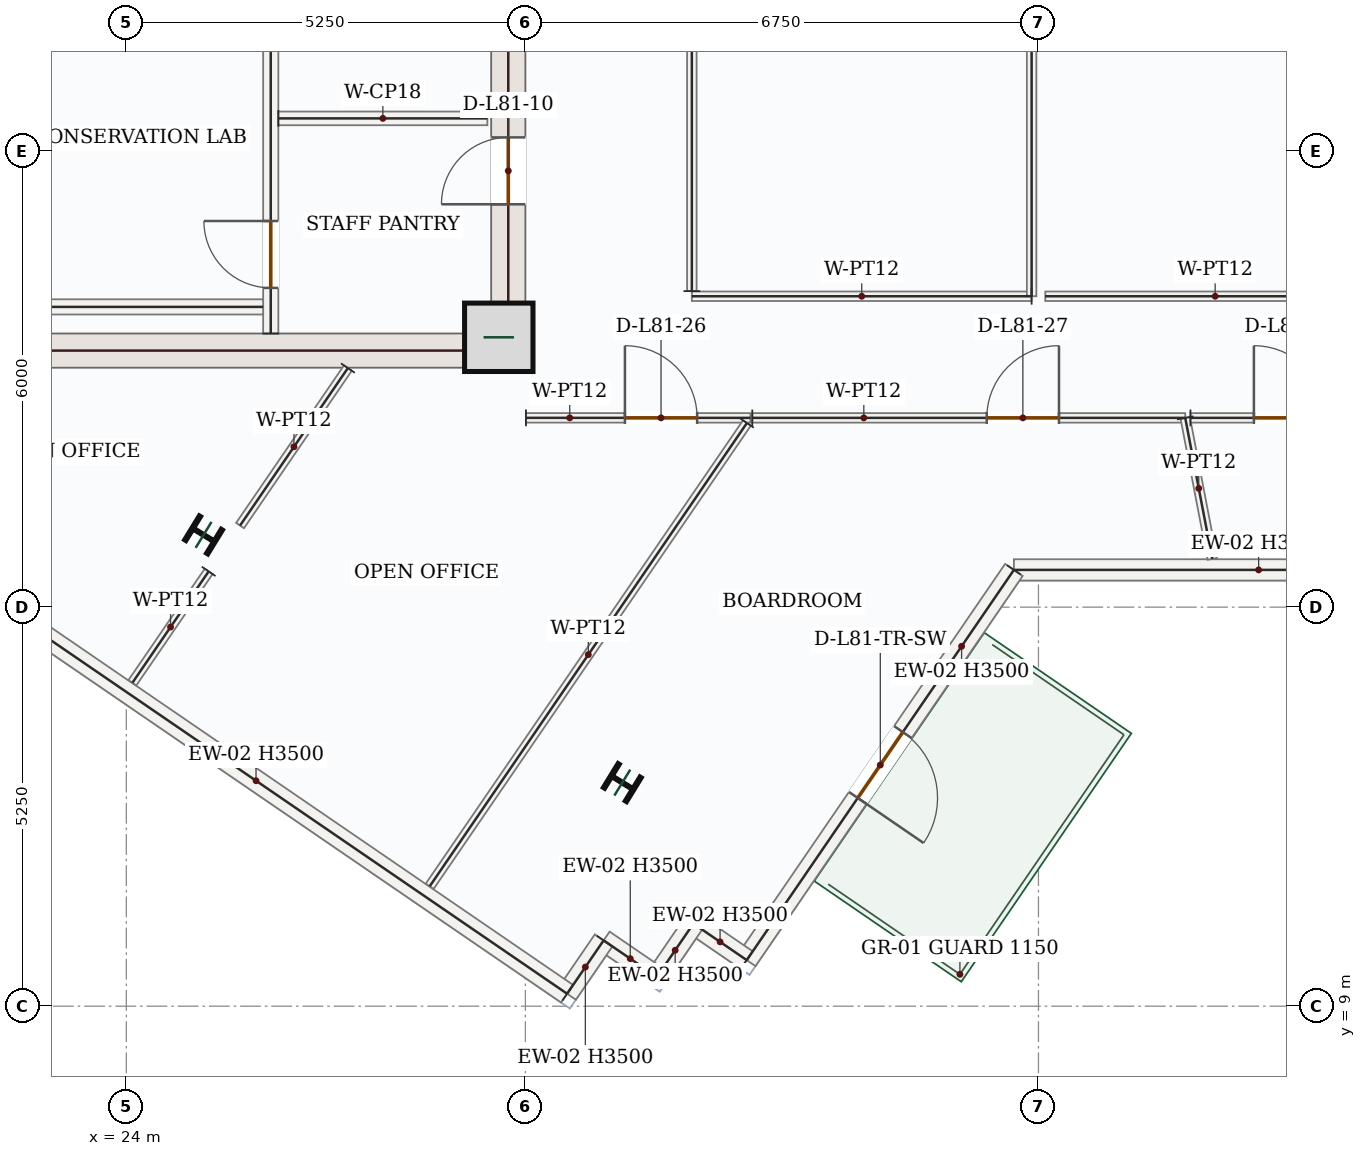
"""IFC4 building model, lengths in metres.
Left out: names, types, materials, properties, quantities, classifications, styles, units other than length and angle.
Written with IfcOpenShell. Run it as: python <this file> out.ifc"""

import sys

from ifc_helpers import new_model, si_unit, direction, frame, frame_2d, origin, origin_2d, place, context, subcontext, project, spatial, rectangle, i_section, extrude, source, transform, mapped, element, fill, save


model = new_model("IFC4")
c1 = context("Model", 3, precision=1e-05, world=origin(), true_north=direction((0.0, 1.0)))
c2 = subcontext(c1, "Body", "Model", "MODEL_VIEW")
j1 = project(units=[si_unit("LENGTHUNIT", "METRE"), si_unit("PLANEANGLEUNIT", "RADIAN")], contexts=[c1])
p1 = place(None, origin())
s1 = spatial("IfcSite", under=j1, at=p1, CompositionType="ELEMENT")
p2 = place(p1, origin())
s2 = spatial("IfcBuilding", under=s1, at=p2, CompositionType="ELEMENT")
p3 = place(p2, frame((0.0, 0.0, 334.8)))
s3 = spatial("IfcBuildingStorey", under=s2, at=p3, CompositionType="ELEMENT", Elevation=334.8)
p4 = place(p3, frame((29.025, 17.4, 0.0), z_axis=(0.0, 0.0, 1.0), x_axis=(0.0, 1.0, 0.0)))
e1 = element("IfcWall", 1, at=p4, inside=s3, PredefinedType="SHEAR", context=c2, shape_type="SweptSolid", body=[
    extrude(rectangle(XDim=8.55, YDim=0.45, at=frame_2d((4.275, 0.0))), origin(), (0.0, 0.0, 1.0), 3.5),
])
p5 = place(p4, frame((6.65, 0.0, 0.0)))
e2 = element("IfcOpeningElement", 2, at=p5, cuts=e1, PredefinedType="OPENING", context=c2, shape_type="SweptSolid", body=[
    extrude(rectangle(XDim=1.1, YDim=2.2, at=frame_2d((0.55, 1.1))), frame((0.0, 0.235, 0.0), z_axis=(0.0, -1.0, 0.0), x_axis=(1.0, 0.0, 0.0)), (0.0, 0.0, 1.0), 0.47),
])
p6 = place(p4, frame((2.15, 0.0, 0.0)))
e3 = element("IfcOpeningElement", 3, at=p6, cuts=e1, PredefinedType="OPENING", context=c2, shape_type="SweptSolid", body=[
    extrude(rectangle(XDim=0.88, YDim=2.1, at=frame_2d((0.44, 1.05))), frame((0.0, 0.235, 0.0), z_axis=(0.0, -1.0, 0.0), x_axis=(1.0, 0.0, 0.0)), (0.0, 0.0, 1.0), 0.47),
])
p7 = place(p4, frame((4.25, 0.0, 0.0)))
e4 = element("IfcOpeningElement", 4, at=p7, cuts=e1, PredefinedType="OPENING", context=c2, shape_type="SweptSolid", body=[
    extrude(rectangle(XDim=0.88, YDim=2.1, at=frame_2d((0.44, 1.05))), frame((0.0, 0.235, 0.0), z_axis=(0.0, -1.0, 0.0), x_axis=(1.0, 0.0, 0.0)), (0.0, 0.0, 1.0), 0.47),
])
m1 = source(origin(), c2, "Body", "SweptSolid", [
    extrude(rectangle(XDim=7.1, YDim=0.45, at=frame_2d((3.55, 0.0))), origin(), (0.0, 0.0, 1.0), 3.5),
])
p8 = place(p3, frame((21.7, 17.625, 0.0), z_axis=(0.0, 0.0, 1.0), x_axis=(1.0, 0.0, 0.0)))
e5 = element("IfcWall", 5, at=p8, inside=s3, PredefinedType="SHEAR", context=c2, shape_type="MappedRepresentation", body=[
    mapped(m1, transform((0.0, 0.0, 0.0), x_axis=(1.0, 0.0, 0.0), y_axis=(0.0, 1.0, 0.0), z_axis=(0.0, 0.0, 1.0), scale=1.0)),
])
m2 = source(origin(), c2, "Body", "SweptSolid", [
    extrude(rectangle(XDim=0.9, YDim=0.9, at=origin_2d()), origin(), (0.0, 0.0, 1.0), 3.75),
])
p9 = place(p3, frame((28.9, 17.8, 0.0), z_axis=(0.0, 0.0, 1.0), x_axis=(1.0, 0.0, 0.0)))
e6 = element("IfcColumn", 6, at=p9, inside=s3, PredefinedType="COLUMN", context=c2, shape_type="MappedRepresentation", body=[
    mapped(m2, transform((0.0, 0.0, 0.0), x_axis=(1.0, 0.0, 0.0), y_axis=(0.0, 1.0, 0.0), z_axis=(0.0, 0.0, 1.0), scale=1.0)),
])
m3 = source(origin(), c2, "Body", "SweptSolid", [
    extrude(i_section(OverallWidth=0.369, OverallDepth=0.356, WebThickness=0.011, FlangeThickness=0.018, FilletRadius=0.018, at=origin_2d()), origin(), (0.0, 0.0, 1.0), 3.75),
])
for number, where, z_axis, x_axis in (
    (7, (25.016, 15.2, 0.0), (0.0, 0.0, 1.0), (0.522, 0.853, 0.0)),
    (8, (30.525, 11.942, 0.0), (0.0, 0.0, 1.0), (0.522, 0.853, 0.0)),
):
    element("IfcColumn", number, at=place(p3, frame(where, z_axis=z_axis, x_axis=x_axis)), inside=s3, PredefinedType="COLUMN", context=c2, shape_type="MappedRepresentation", body=[
        mapped(m3, transform((0.0, 0.0, 0.0), x_axis=(1.0, 0.0, 0.0), y_axis=(0.0, 1.0, 0.0), z_axis=(0.0, 0.0, 1.0), scale=1.0)),
    ])
m4 = source(origin(), c2, "Body", "SweptSolid", [
    extrude(rectangle(XDim=6.44, YDim=0.28, at=frame_2d((3.22, 0.0))), origin(), (0.0, 0.0, 1.0), 3.5),
])
p10 = place(p3, frame((42.117, 14.74, 0.0), z_axis=(0.0, 0.0, 1.0), x_axis=(-1.0, 0.0, 0.0)))
e9 = element("IfcWall", 9, at=p10, inside=s3, PredefinedType="SOLIDWALL", context=c2, shape_type="MappedRepresentation", body=[
    mapped(m4, transform((0.0, 0.0, 0.0), x_axis=(1.0, 0.0, 0.0), y_axis=(0.0, 1.0, 0.0), z_axis=(0.0, 0.0, 1.0), scale=1.0)),
])
p11 = place(p3, frame((35.677, 14.74, 0.0), z_axis=(0.0, 0.0, 1.0), x_axis=(-0.564953982519, -0.825122413728, 0.0)))
e10 = element("IfcWall", 10, at=p11, inside=s3, PredefinedType="SOLIDWALL", context=c2, shape_type="SweptSolid", body=[
    extrude(rectangle(XDim=6.221, YDim=0.28, at=frame_2d((3.111, 0.0))), origin(), (0.0, 0.0, 1.0), 3.5),
])
p12 = place(p11, frame((2.586, 0.0, 0.0)))
e11 = element("IfcOpeningElement", 11, at=p12, cuts=e10, PredefinedType="OPENING", context=c2, shape_type="SweptSolid", body=[
    extrude(rectangle(XDim=1.05, YDim=2.15, at=frame_2d((0.525, 1.075))), frame((0.0, 0.15, 0.0), z_axis=(0.0, -1.0, 0.0), x_axis=(1.0, 0.0, 0.0)), (0.0, 0.0, 1.0), 0.3),
])
m5 = source(origin(), c2, "Body", "SweptSolid", [
    extrude(rectangle(XDim=0.85, YDim=0.28, at=frame_2d((0.425, 0.0))), origin(), (0.0, 0.0, 1.0), 3.5),
])
for number, where, z_axis, x_axis in (
    (12, (32.162, 9.606, 0.0), (0.0, 0.0, 1.0), (-0.825, 0.565, 0.0)),
    (13, (31.461, 10.087, 0.0), (0.0, 0.0, 1.0), (-0.565, -0.825, 0.0)),
    (14, (30.98, 9.385, 0.0), (0.0, 0.0, 1.0), (-0.825, 0.565, 0.0)),
):
    element("IfcWall", number, at=place(p3, frame(where, z_axis=z_axis, x_axis=x_axis)), inside=s3, PredefinedType="SOLIDWALL", context=c2, shape_type="MappedRepresentation", body=[
        mapped(m5, transform((0.0, 0.0, 0.0), x_axis=(1.0, 0.0, 0.0), y_axis=(0.0, 1.0, 0.0), z_axis=(0.0, 0.0, 1.0), scale=1.0)),
    ])
m6 = source(origin(), c2, "Body", "SweptSolid", [
    extrude(rectangle(XDim=0.85, YDim=0.28, at=frame_2d((0.425, 0.0))), origin(), (0.0, 0.0, 1.0), 3.5),
])
p13 = place(p3, frame((30.279, 9.865, 0.0), z_axis=(0.0, 0.0, 1.0), x_axis=(-0.565064897913, -0.825046459993, 0.0)))
e15 = element("IfcWall", 15, at=p13, inside=s3, PredefinedType="SOLIDWALL", context=c2, shape_type="MappedRepresentation", body=[
    mapped(m6, transform((0.0, 0.0, 0.0), x_axis=(1.0, 0.0, 0.0), y_axis=(0.0, 1.0, 0.0), z_axis=(0.0, 0.0, 1.0), scale=1.0)),
])
m7 = source(origin(), c2, "Body", "SweptSolid", [
    extrude(rectangle(XDim=9.92, YDim=0.28, at=frame_2d((4.96, 0.0))), origin(), (0.0, 0.0, 1.0), 3.5),
])
p14 = place(p3, frame((29.799, 9.164, 0.0), z_axis=(0.0, 0.0, 1.0), x_axis=(-0.825121888295, 0.56495474992, 0.0)))
e16 = element("IfcWall", 16, at=p14, inside=s3, PredefinedType="SOLIDWALL", context=c2, shape_type="MappedRepresentation", body=[
    mapped(m7, transform((0.0, 0.0, 0.0), x_axis=(1.0, 0.0, 0.0), y_axis=(0.0, 1.0, 0.0), z_axis=(0.0, 0.0, 1.0), scale=1.0)),
])
p15 = place(p3, frame((25.9, 17.85, 0.0), z_axis=(0.0, 0.0, 1.0), x_axis=(0.0, 1.0, 0.0)))
e17 = element("IfcWall", 17, at=p15, inside=s3, PredefinedType="SOLIDWALL", context=c2, shape_type="SweptSolid", body=[
    extrude(rectangle(XDim=8.0, YDim=0.2, at=frame_2d((4.0, 0.0))), origin(), (0.0, 0.0, 1.0), 3.5),
])
p16 = place(p15, frame((6.2, 0.0, 0.0)))
e18 = element("IfcOpeningElement", 18, at=p16, cuts=e17, PredefinedType="OPENING", context=c2, shape_type="SweptSolid", body=[
    extrude(rectangle(XDim=1.0, YDim=2.15, at=frame_2d((0.5, 1.075))), frame((0.0, 0.11, 0.0), z_axis=(0.0, -1.0, 0.0), x_axis=(1.0, 0.0, 0.0)), (0.0, 0.0, 1.0), 0.22),
])
p17 = place(p15, frame((0.6, 0.0, 0.0)))
e19 = element("IfcOpeningElement", 19, at=p17, cuts=e17, PredefinedType="OPENING", context=c2, shape_type="SweptSolid", body=[
    extrude(rectangle(XDim=0.88, YDim=2.1, at=frame_2d((0.44, 1.05))), frame((0.0, 0.11, 0.0), z_axis=(0.0, -1.0, 0.0), x_axis=(1.0, 0.0, 0.0)), (0.0, 0.0, 1.0), 0.22),
])
m8 = source(origin(), c2, "Body", "SweptSolid", [
    extrude(rectangle(XDim=3.25, YDim=0.2, at=frame_2d((1.625, 0.0))), origin(), (0.0, 0.0, 1.0), 3.5),
])
p18 = place(p3, frame((22.55, 18.2, 0.0), z_axis=(0.0, 0.0, 1.0), x_axis=(1.0, 0.0, 0.0)))
e20 = element("IfcWall", 20, at=p18, inside=s3, PredefinedType="SOLIDWALL", context=c2, shape_type="MappedRepresentation", body=[
    mapped(m8, transform((0.0, 0.0, 0.0), x_axis=(1.0, 0.0, 0.0), y_axis=(0.0, 1.0, 0.0), z_axis=(0.0, 0.0, 1.0), scale=1.0)),
])
m9 = source(origin(), c2, "Body", "SweptSolid", [
    extrude(rectangle(XDim=2.75, YDim=0.18, at=frame_2d((1.375, 0.0))), origin(), (0.0, 0.0, 1.0), 3.5),
])
p19 = place(p3, frame((26.0, 20.68, 0.0), z_axis=(0.0, 0.0, 1.0), x_axis=(1.0, 0.0, 0.0)))
e21 = element("IfcWall", 21, at=p19, inside=s3, PredefinedType="PARTITIONING", context=c2, shape_type="MappedRepresentation", body=[
    mapped(m9, transform((0.0, 0.0, 0.0), x_axis=(1.0, 0.0, 0.0), y_axis=(0.0, 1.0, 0.0), z_axis=(0.0, 0.0, 1.0), scale=1.0)),
])
m10 = source(origin(), c2, "Body", "SweptSolid", [
    extrude(rectangle(XDim=2.511, YDim=0.125, at=frame_2d((1.255, 0.0))), origin(), (0.0, 0.0, 1.0), 3.5),
])
p20 = place(p3, frame((26.915, 17.395, 0.0), z_axis=(0.0, 0.0, 1.0), x_axis=(-0.564980194272, -0.825104466162, 0.0)))
e22 = element("IfcWall", 22, at=p20, inside=s3, PredefinedType="PARTITIONING", context=c2, shape_type="MappedRepresentation", body=[
    mapped(m10, transform((0.0, 0.0, 0.0), x_axis=(1.0, 0.0, 0.0), y_axis=(0.0, 1.0, 0.0), z_axis=(0.0, 0.0, 1.0), scale=1.0)),
])
m11 = source(origin(), c2, "Body", "SweptSolid", [
    extrude(rectangle(XDim=1.775, YDim=0.125, at=frame_2d((0.888, 0.0))), origin(), (0.0, 0.0, 1.0), 3.5),
])
p21 = place(p3, frame((25.083, 14.72, 0.0), z_axis=(0.0, 0.0, 1.0), x_axis=(-0.56509798207, -0.825023800057, 0.0)))
e23 = element("IfcWall", 23, at=p21, inside=s3, PredefinedType="PARTITIONING", context=c2, shape_type="MappedRepresentation", body=[
    mapped(m11, transform((0.0, 0.0, 0.0), x_axis=(1.0, 0.0, 0.0), y_axis=(0.0, 1.0, 0.0), z_axis=(0.0, 0.0, 1.0), scale=1.0)),
])
p22 = place(p3, frame((29.258, 16.74, 0.0), z_axis=(0.0, 0.0, 1.0), x_axis=(0.999999996583, -8.2671957e-05, 0.0)))
e24 = element("IfcWall", 24, at=p22, inside=s3, PredefinedType="PARTITIONING", context=c2, shape_type="SweptSolid", body=[
    extrude(rectangle(XDim=2.953, YDim=0.125, at=frame_2d((1.477, 0.0))), origin(), (0.0, 0.0, 1.0), 3.5),
])
p23 = place(p22, frame((1.302, 0.0, 0.0)))
e25 = element("IfcOpeningElement", 25, at=p23, cuts=e24, PredefinedType="OPENING", context=c2, shape_type="SweptSolid", body=[
    extrude(rectangle(XDim=0.95, YDim=2.15, at=frame_2d((0.475, 1.075))), frame((0.0, 0.073, 0.0), z_axis=(0.0, -1.0, 0.0), x_axis=(1.0, 0.0, 0.0)), (0.0, 0.0, 1.0), 0.145),
])
m12 = source(origin(), c2, "Body", "SweptSolid", [
    extrude(rectangle(XDim=7.387, YDim=0.125, at=frame_2d((3.693, 0.0))), origin(), (0.0, 0.0, 1.0), 3.5),
])
p24 = place(p3, frame((32.165, 16.673, 0.0), z_axis=(0.0, 0.0, 1.0), x_axis=(-0.564969427755, -0.8251118383, 0.0)))
e26 = element("IfcWall", 26, at=p24, inside=s3, PredefinedType="PARTITIONING", context=c2, shape_type="MappedRepresentation", body=[
    mapped(m12, transform((0.0, 0.0, 0.0), x_axis=(1.0, 0.0, 0.0), y_axis=(0.0, 1.0, 0.0), z_axis=(0.0, 0.0, 1.0), scale=1.0)),
])
m13 = source(origin(), c2, "Body", "SweptSolid", [
    extrude(rectangle(XDim=4.47, YDim=0.125, at=frame_2d((2.235, 0.0))), origin(), (0.0, 0.0, 1.0), 3.5),
])
p25 = place(p3, frame((35.91, 18.34, 0.0), z_axis=(0.0, 0.0, 1.0), x_axis=(-1.0, 0.0, 0.0)))
e27 = element("IfcWall", 27, at=p25, inside=s3, PredefinedType="PARTITIONING", context=c2, shape_type="MappedRepresentation", body=[
    mapped(m13, transform((0.0, 0.0, 0.0), x_axis=(1.0, 0.0, 0.0), y_axis=(0.0, 1.0, 0.0), z_axis=(0.0, 0.0, 1.0), scale=1.0)),
])
m14 = source(origin(), c2, "Body", "SweptSolid", [
    extrude(rectangle(XDim=7.403, YDim=0.125, at=frame_2d((3.701, 0.0))), origin(), (0.0, 0.0, 1.0), 3.5),
])
p26 = place(p3, frame((31.44, 18.407, 0.0), z_axis=(0.0, 0.0, 1.0), x_axis=(0.0, 1.0, 0.0)))
e28 = element("IfcWall", 28, at=p26, inside=s3, PredefinedType="PARTITIONING", context=c2, shape_type="MappedRepresentation", body=[
    mapped(m14, transform((0.0, 0.0, 0.0), x_axis=(1.0, 0.0, 0.0), y_axis=(0.0, 1.0, 0.0), z_axis=(0.0, 0.0, 1.0), scale=1.0)),
])
m15 = source(origin(), c2, "Body", "SweptSolid", [
    extrude(rectangle(XDim=7.47, YDim=0.125, at=frame_2d((3.735, 0.0))), origin(), (0.0, 0.0, 1.0), 3.5),
])
p27 = place(p3, frame((35.91, 25.81, 0.0), z_axis=(0.0, 0.0, 1.0), x_axis=(0.0, -1.0, 0.0)))
e29 = element("IfcWall", 29, at=p27, inside=s3, PredefinedType="PARTITIONING", context=c2, shape_type="MappedRepresentation", body=[
    mapped(m15, transform((0.0, 0.0, 0.0), x_axis=(1.0, 0.0, 0.0), y_axis=(0.0, 1.0, 0.0), z_axis=(0.0, 0.0, 1.0), scale=1.0)),
])
p28 = place(p3, frame((40.56, 18.34, 0.0), z_axis=(0.0, 0.0, 1.0), x_axis=(-1.0, 0.0, 0.0)))
e30 = element("IfcWall", 30, at=p28, inside=s3, PredefinedType="PARTITIONING", context=c2, shape_type="MappedRepresentation", body=[
    mapped(m13, transform((0.0, 0.0, 0.0), x_axis=(1.0, 0.0, 0.0), y_axis=(0.0, 1.0, 0.0), z_axis=(0.0, 0.0, 1.0), scale=1.0)),
])
p29 = place(p3, frame((32.235, 16.74, 0.0), z_axis=(0.0, 0.0, 1.0), x_axis=(1.0, 0.0, 0.0)))
e31 = element("IfcWall", 31, at=p29, inside=s3, PredefinedType="PARTITIONING", context=c2, shape_type="SweptSolid", body=[
    extrude(rectangle(XDim=5.696, YDim=0.125, at=frame_2d((2.848, 0.0))), origin(), (0.0, 0.0, 1.0), 3.5),
])
p30 = place(p29, frame((3.085, 0.0, 0.0)))
e32 = element("IfcOpeningElement", 32, at=p30, cuts=e31, PredefinedType="OPENING", context=c2, shape_type="SweptSolid", body=[
    extrude(rectangle(XDim=0.95, YDim=2.15, at=frame_2d((0.475, 1.075))), frame((0.0, 0.073, 0.0), z_axis=(0.0, -1.0, 0.0), x_axis=(1.0, 0.0, 0.0)), (0.0, 0.0, 1.0), 0.145),
])
m16 = source(origin(), c2, "Body", "SweptSolid", [
    extrude(rectangle(XDim=1.889, YDim=0.125, at=frame_2d((0.944, 0.0))), origin(), (0.0, 0.0, 1.0), 3.5),
])
p31 = place(p3, frame((37.931, 16.74, 0.0), z_axis=(0.0, 0.0, 1.0), x_axis=(0.188454265316, -0.982081966989, 0.0)))
e33 = element("IfcWall", 33, at=p31, inside=s3, PredefinedType="PARTITIONING", context=c2, shape_type="MappedRepresentation", body=[
    mapped(m16, transform((0.0, 0.0, 0.0), x_axis=(1.0, 0.0, 0.0), y_axis=(0.0, 1.0, 0.0), z_axis=(0.0, 0.0, 1.0), scale=1.0)),
])
p32 = place(p3, frame((38.0, 16.74, 0.0), z_axis=(0.0, 0.0, 1.0), x_axis=(1.0, 0.0, 0.0)))
e34 = element("IfcWall", 34, at=p32, inside=s3, PredefinedType="PARTITIONING", context=c2, shape_type="SweptSolid", body=[
    extrude(rectangle(XDim=4.744, YDim=0.125, at=frame_2d((2.372, 0.0))), origin(), (0.0, 0.0, 1.0), 3.5),
])
p33 = place(p32, frame((0.835, 0.0, 0.0)))
e35 = element("IfcOpeningElement", 35, at=p33, cuts=e34, PredefinedType="OPENING", context=c2, shape_type="SweptSolid", body=[
    extrude(rectangle(XDim=0.95, YDim=2.15, at=frame_2d((0.475, 1.075))), frame((0.0, 0.073, 0.0), z_axis=(0.0, -1.0, 0.0), x_axis=(1.0, 0.0, 0.0)), (0.0, 0.0, 1.0), 0.145),
])
m17 = source(origin(), c2, "Body", "SweptSolid", [
    extrude(rectangle(XDim=1.05, YDim=2.15, at=frame_2d((0.525, 1.075))), frame((0.0, 0.025, 0.0), z_axis=(0.0, -1.0, 0.0), x_axis=(1.0, 0.0, 0.0)), (0.0, 0.0, 1.0), 0.05),
])
p34 = place(p12, origin())
e36 = element("IfcDoor", 36, at=p34, inside=s3, OperationType="SINGLE_SWING_RIGHT", PredefinedType="DOOR", context=c2, shape_type="MappedRepresentation", body=[
    mapped(m17, transform((0.0, 0.0, 0.0), x_axis=(1.0, 0.0, 0.0), y_axis=(0.0, 1.0, 0.0), z_axis=(0.0, 0.0, 1.0), scale=1.0)),
])
fill(e11, e36)
m18 = source(origin(), c2, "Body", "SweptSolid", [
    extrude(rectangle(XDim=0.88, YDim=2.1, at=frame_2d((0.44, 1.05))), frame((0.0, 0.025, 0.0), z_axis=(0.0, -1.0, 0.0), x_axis=(1.0, 0.0, 0.0)), (0.0, 0.0, 1.0), 0.05),
])
p35 = place(p17, origin())
e37 = element("IfcDoor", 37, at=p35, inside=s3, OperationType="SINGLE_SWING_RIGHT", PredefinedType="DOOR", context=c2, shape_type="MappedRepresentation", body=[
    mapped(m18, transform((0.0, 0.0, 0.0), x_axis=(1.0, 0.0, 0.0), y_axis=(0.0, 1.0, 0.0), z_axis=(0.0, 0.0, 1.0), scale=1.0)),
])
fill(e19, e37)
p36 = place(p6, origin())
e38 = element("IfcDoor", 38, at=p36, inside=s3, OperationType="SINGLE_SWING_LEFT", PredefinedType="DOOR", context=c2, shape_type="MappedRepresentation", body=[
    mapped(m18, transform((0.0, 0.0, 0.0), x_axis=(1.0, 0.0, 0.0), y_axis=(0.0, 1.0, 0.0), z_axis=(0.0, 0.0, 1.0), scale=1.0)),
])
fill(e3, e38)
m19 = source(origin(), c2, "Body", "SweptSolid", [
    extrude(rectangle(XDim=0.95, YDim=2.15, at=frame_2d((0.475, 1.075))), frame((0.0, 0.025, 0.0), z_axis=(0.0, -1.0, 0.0), x_axis=(1.0, 0.0, 0.0)), (0.0, 0.0, 1.0), 0.05),
])
p37 = place(p23, origin())
e39 = element("IfcDoor", 39, at=p37, inside=s3, OperationType="SINGLE_SWING_LEFT", PredefinedType="DOOR", context=c2, shape_type="MappedRepresentation", body=[
    mapped(m19, transform((0.0, 0.0, 0.0), x_axis=(1.0, 0.0, 0.0), y_axis=(0.0, 1.0, 0.0), z_axis=(0.0, 0.0, 1.0), scale=1.0)),
])
fill(e25, e39)
p38 = place(p30, origin())
e40 = element("IfcDoor", 40, at=p38, inside=s3, OperationType="SINGLE_SWING_RIGHT", PredefinedType="DOOR", context=c2, shape_type="MappedRepresentation", body=[
    mapped(m19, transform((0.0, 0.0, 0.0), x_axis=(1.0, 0.0, 0.0), y_axis=(0.0, 1.0, 0.0), z_axis=(0.0, 0.0, 1.0), scale=1.0)),
])
fill(e32, e40)
p39 = place(p33, origin())
e41 = element("IfcDoor", 41, at=p39, inside=s3, OperationType="SINGLE_SWING_LEFT", PredefinedType="DOOR", context=c2, shape_type="MappedRepresentation", body=[
    mapped(m19, transform((0.0, 0.0, 0.0), x_axis=(1.0, 0.0, 0.0), y_axis=(0.0, 1.0, 0.0), z_axis=(0.0, 0.0, 1.0), scale=1.0)),
])
fill(e35, e41)
save(model, sys.argv[1])
